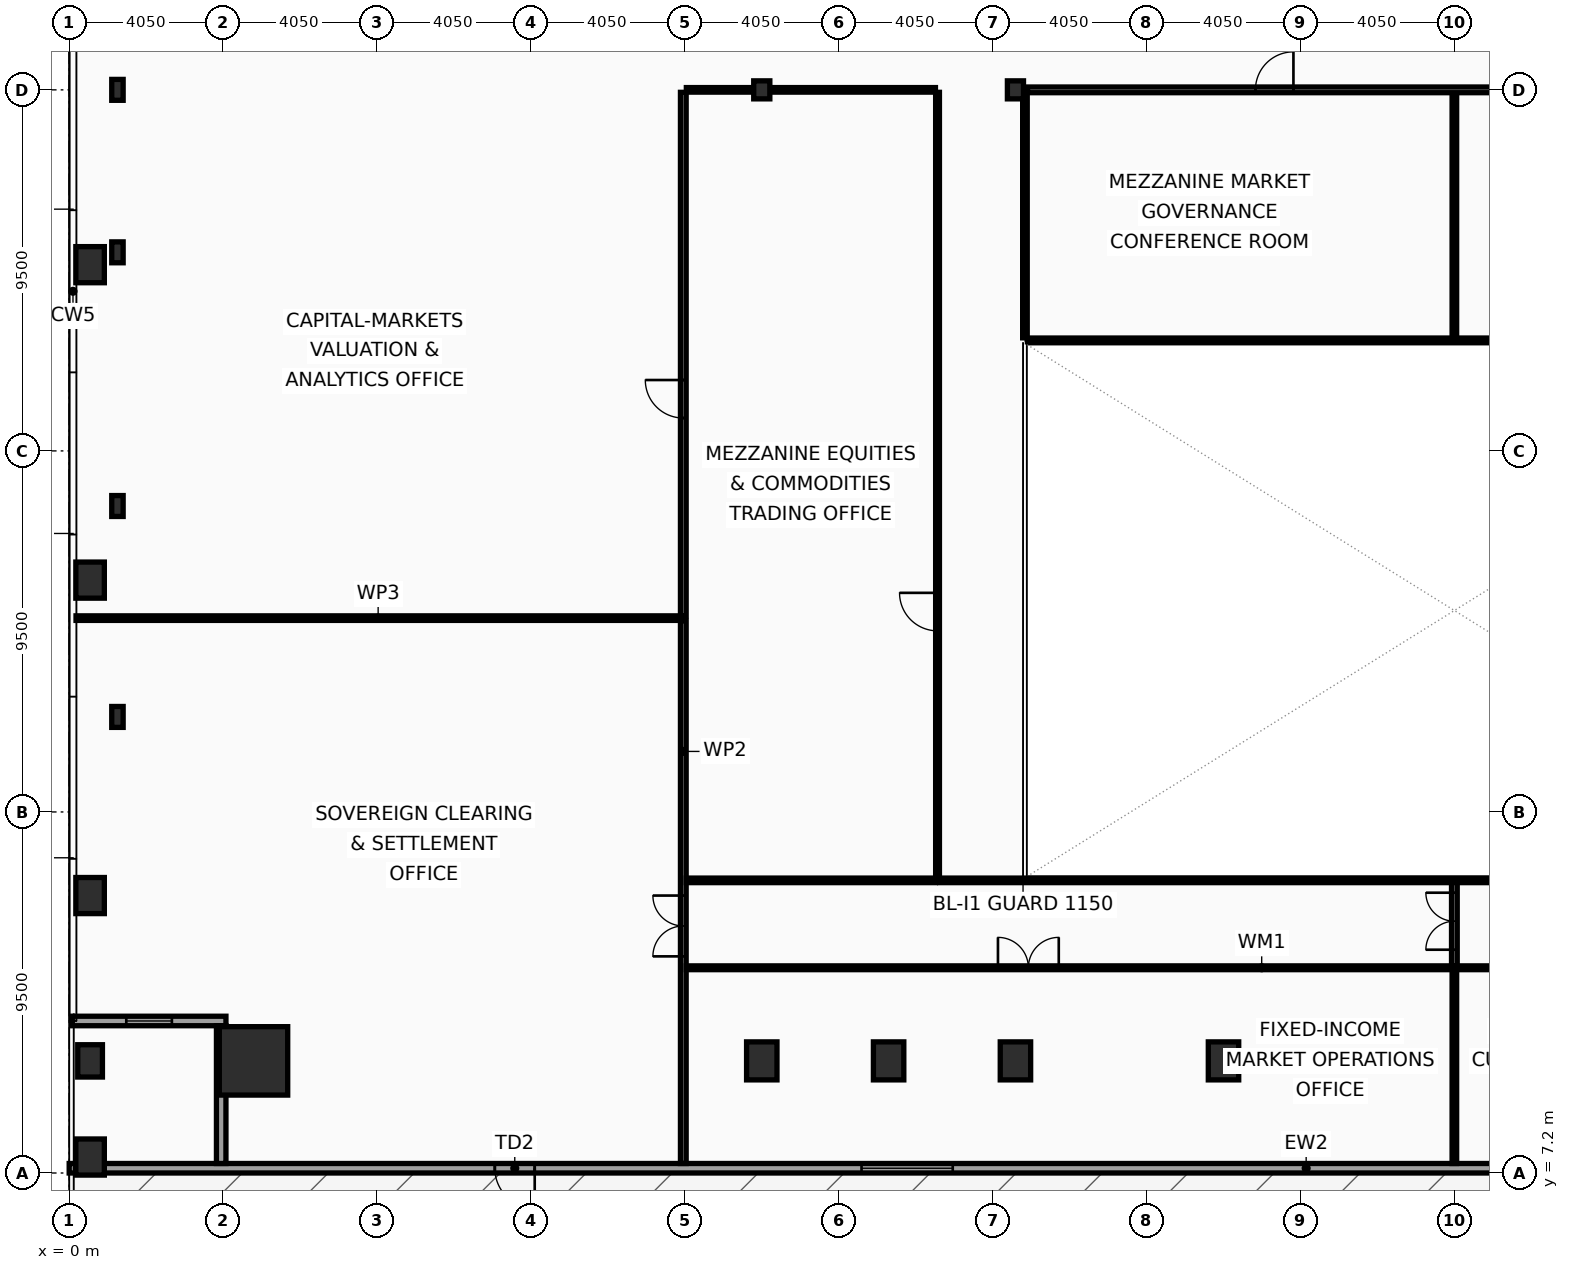
"""IFC4 building model, lengths in metres.
Left out: names, types, materials, properties, quantities, classifications, styles, units other than length and angle.
Written with IfcOpenShell. Run it as: python <this file> out.ifc"""

import sys

from ifc_helpers import new_model, si_unit, direction, frame, frame_2d, origin, origin_2d, place, context, subcontext, project, spatial, rectangle, hollow_rectangle, i_section, extrude, element, fill, save


model = new_model("IFC4")
c1 = context("Model", 3, precision=1e-05, world=origin(), true_north=direction((0.0, 1.0)))
c2 = subcontext(c1, "Body", "Model", "MODEL_VIEW")
j1 = project(units=[si_unit("LENGTHUNIT", "METRE"), si_unit("PLANEANGLEUNIT", "RADIAN")], contexts=[c1])
p1 = place(None, origin())
s1 = spatial("IfcSite", under=j1, at=p1, CompositionType="ELEMENT")
p2 = place(p1, origin())
s2 = spatial("IfcBuilding", under=s1, at=p2, CompositionType="ELEMENT")
p3 = place(p2, frame((0.0, 0.0, 10.4)))
s3 = spatial("IfcBuildingStorey", under=s2, at=p3, CompositionType="ELEMENT", Elevation=10.4)
p4 = place(p3, frame((4.85, 10.15, 0.0), z_axis=(0.0, 0.0, 1.0), x_axis=(1.0, 0.0, 0.0)))
e1 = element("IfcColumn", 1, at=p4, inside=s3, PredefinedType="COLUMN", context=c2, shape_type="SweptSolid", body=[
    extrude(hollow_rectangle(XDim=1.8, YDim=1.8, WallThickness=0.08, at=origin_2d()), origin(), (0.0, 0.0, 1.0), 5.0),
])
for number, where, z_axis, x_axis in (
    (2, (18.225, 10.15, 0.0), (0.0, 0.0, 1.0), (1.0, 0.0, 0.0)),
    (3, (21.562, 10.15, 0.0), (0.0, 0.0, 1.0), (1.0, 0.0, 0.0)),
    (4, (24.9, 10.15, 0.0), (0.0, 0.0, 1.0), (1.0, 0.0, 0.0)),
    (5, (30.375, 10.15, 0.0), (0.0, 0.0, 1.0), (1.0, 0.0, 0.0)),
):
    element("IfcColumn", number, at=place(p3, frame(where, z_axis=z_axis, x_axis=x_axis)), inside=s3, PredefinedType="COLUMN", context=c2, shape_type="SweptSolid", body=[
        extrude(hollow_rectangle(XDim=0.8, YDim=1.0, WallThickness=0.055, at=origin_2d()), origin(), (0.0, 0.0, 1.0), 5.0),
    ])
for number, where, z_axis, x_axis in (
    (6, (1.27, 19.2, 0.0), (0.0, 0.0, 1.0), (1.0, 0.0, 0.0)),
    (7, (1.27, 24.75, 0.0), (0.0, 0.0, 1.0), (1.0, 0.0, 0.0)),
    (8, (1.27, 31.425, 0.0), (0.0, 0.0, 1.0), (1.0, 0.0, 0.0)),
    (9, (1.27, 35.7, 0.0), (0.0, 0.0, 1.0), (1.0, 0.0, 0.0)),
):
    element("IfcColumn", number, at=place(p3, frame(where, z_axis=z_axis, x_axis=x_axis)), inside=s3, PredefinedType="COLUMN", context=c2, shape_type="SweptSolid", body=[
        extrude(i_section(OverallWidth=0.3, OverallDepth=0.55, WebThickness=0.015, FlangeThickness=0.029, at=origin_2d()), origin(), (0.0, 0.0, 1.0), 5.0),
    ])
for number, where, z_axis, x_axis in (
    (10, (18.225, 35.7, 0.0), (0.0, 0.0, 1.0), (1.0, 0.0, 0.0)),
    (11, (24.9, 35.7, 0.0), (0.0, 0.0, 1.0), (1.0, 0.0, 0.0)),
):
    element("IfcColumn", number, at=place(p3, frame(where, z_axis=z_axis, x_axis=x_axis)), inside=s3, PredefinedType="COLUMN", context=c2, shape_type="SweptSolid", body=[
        extrude(i_section(OverallWidth=0.424, OverallDepth=0.474, WebThickness=0.048, FlangeThickness=0.077, at=origin_2d()), origin(), (0.0, 0.0, 1.0), 5.0),
    ])
p5 = place(p3, frame((0.55, 7.62, 0.0), z_axis=(0.0, 0.0, 1.0), x_axis=(1.0, 0.0, 0.0)))
e12 = element("IfcColumn", 12, at=p5, inside=s3, PredefinedType="PILASTER", context=c2, shape_type="SweptSolid", body=[
    extrude(rectangle(XDim=0.75, YDim=0.95, at=origin_2d()), origin(), (0.0, 0.0, 1.0), 5.0),
])
p6 = place(p3, frame((0.55, 10.15, 0.0), z_axis=(0.0, 0.0, 1.0), x_axis=(1.0, 0.0, 0.0)))
e13 = element("IfcColumn", 13, at=p6, inside=s3, PredefinedType="PILASTER", context=c2, shape_type="SweptSolid", body=[
    extrude(rectangle(XDim=0.65, YDim=0.85, at=origin_2d()), origin(), (0.0, 0.0, 1.0), 5.0),
])
for number, where, z_axis, x_axis in (
    (14, (0.55, 14.5, 0.0), (0.0, 0.0, 1.0), (1.0, 0.0, 0.0)),
    (15, (0.55, 22.8, 0.0), (0.0, 0.0, 1.0), (1.0, 0.0, 0.0)),
    (16, (0.55, 31.1, 0.0), (0.0, 0.0, 1.0), (1.0, 0.0, 0.0)),
):
    element("IfcColumn", number, at=place(p3, frame(where, z_axis=z_axis, x_axis=x_axis)), inside=s3, PredefinedType="PILASTER", context=c2, shape_type="SweptSolid", body=[
        extrude(rectangle(XDim=0.75, YDim=0.95, at=origin_2d()), origin(), (0.0, 0.0, 1.0), 5.0),
    ])
p7 = place(p3, frame((72.9, 7.325, 0.0), z_axis=(0.0, 0.0, 1.0), x_axis=(-1.0, 0.0, 0.0)))
e17 = element("IfcWall", 17, at=p7, inside=s3, PredefinedType="SOLIDWALL", context=c2, shape_type="SweptSolid", body=[
    extrude(rectangle(XDim=72.9, YDim=0.25, at=frame_2d((36.45, 0.0))), origin(), (0.0, 0.0, 1.0), 3.89),
])
p8 = place(p7, frame((10.45, 0.0, 0.0)))
e18 = element("IfcOpeningElement", 18, at=p8, cuts=e17, PredefinedType="OPENING", context=c2, shape_type="SweptSolid", body=[
    extrude(rectangle(XDim=1.6, YDim=2.2, at=frame_2d((0.8, 1.1))), frame((0.0, 0.135, 0.0), z_axis=(0.0, -1.0, 0.0), x_axis=(1.0, 0.0, 0.0)), (0.0, 0.0, 1.0), 0.27),
])
p9 = place(p7, frame((29.45, 0.0, 0.0)))
e19 = element("IfcOpeningElement", 19, at=p9, cuts=e17, PredefinedType="OPENING", context=c2, shape_type="SweptSolid", body=[
    extrude(rectangle(XDim=1.6, YDim=2.2, at=frame_2d((0.8, 1.1))), frame((0.0, 0.135, 0.0), z_axis=(0.0, -1.0, 0.0), x_axis=(1.0, 0.0, 0.0)), (0.0, 0.0, 1.0), 0.27),
])
p10 = place(p7, frame((60.65, 0.0, 0.0)))
e20 = element("IfcOpeningElement", 20, at=p10, cuts=e17, PredefinedType="OPENING", context=c2, shape_type="SweptSolid", body=[
    extrude(rectangle(XDim=1.05, YDim=2.15, at=frame_2d((0.525, 1.075))), frame((0.0, 0.135, 0.0), z_axis=(0.0, -1.0, 0.0), x_axis=(1.0, 0.0, 0.0)), (0.0, 0.0, 1.0), 0.27),
])
p11 = place(p7, frame((21.05, 0.0, 0.85)))
e21 = element("IfcOpeningElement", 21, at=p11, cuts=e17, PredefinedType="OPENING", context=c2, shape_type="SweptSolid", body=[
    extrude(rectangle(XDim=2.4, YDim=2.6, at=frame_2d((1.2, 1.3))), frame((0.0, 0.135, 0.0), z_axis=(0.0, -1.0, 0.0), x_axis=(1.0, 0.0, 0.0)), (0.0, 0.0, 1.0), 0.27),
])
p12 = place(p7, frame((49.65, 0.0, 0.85)))
e22 = element("IfcOpeningElement", 22, at=p12, cuts=e17, PredefinedType="OPENING", context=c2, shape_type="SweptSolid", body=[
    extrude(rectangle(XDim=2.4, YDim=2.6, at=frame_2d((1.2, 1.3))), frame((0.0, 0.135, 0.0), z_axis=(0.0, -1.0, 0.0), x_axis=(1.0, 0.0, 0.0)), (0.0, 0.0, 1.0), 0.27),
])
p13 = place(p3, frame((4.125, 11.2, 0.0), z_axis=(0.0, 0.0, 1.0), x_axis=(-1.0, 0.0, 0.0)))
e23 = element("IfcWall", 23, at=p13, inside=s3, PredefinedType="SOLIDWALL", context=c2, shape_type="SweptSolid", body=[
    extrude(rectangle(XDim=4.045, YDim=0.25, at=frame_2d((2.022, 0.0))), origin(), (0.0, 0.0, 1.0), 4.14),
])
p14 = place(p13, frame((1.423, 0.0, 0.9)))
e24 = element("IfcOpeningElement", 24, at=p14, cuts=e23, PredefinedType="OPENING", context=c2, shape_type="SweptSolid", body=[
    extrude(rectangle(XDim=1.2, YDim=2.8, at=frame_2d((0.6, 1.4))), frame((0.0, 0.135, 0.0), z_axis=(0.0, -1.0, 0.0), x_axis=(1.0, 0.0, 0.0)), (0.0, 0.0, 1.0), 0.27),
])
p15 = place(p3, frame((4.0, 7.45, 0.0), z_axis=(0.0, 0.0, 1.0), x_axis=(0.0, 1.0, 0.0)))
e25 = element("IfcWall", 25, at=p15, inside=s3, PredefinedType="SOLIDWALL", context=c2, shape_type="SweptSolid", body=[
    extrude(rectangle(XDim=3.625, YDim=0.25, at=frame_2d((1.812, 0.0))), origin(), (0.0, 0.0, 1.0), 4.14),
])
p16 = place(p3, frame((16.16, 7.45, 0.0), z_axis=(0.0, 0.0, 1.0), x_axis=(0.0, 1.0, 0.0)))
e26 = element("IfcWall", 26, at=p16, inside=s3, PredefinedType="PARTITIONING", context=c2, shape_type="SweptSolid", body=[
    extrude(rectangle(XDim=14.285, YDim=0.15, at=frame_2d((7.143, 0.0))), origin(), (0.0, 0.0, 1.0), 3.89),
])
p17 = place(p16, frame((5.45, 0.0, 0.0)))
e27 = element("IfcOpeningElement", 27, at=p17, cuts=e26, PredefinedType="OPENING", context=c2, shape_type="SweptSolid", body=[
    extrude(rectangle(XDim=1.6, YDim=2.15, at=frame_2d((0.8, 1.075))), frame((0.0, 0.085, 0.0), z_axis=(0.0, -1.0, 0.0), x_axis=(1.0, 0.0, 0.0)), (0.0, 0.0, 1.0), 0.17),
])
p18 = place(p3, frame((16.16, 21.865, 0.0), z_axis=(0.0, 0.0, 1.0), x_axis=(0.0, 1.0, 0.0)))
e28 = element("IfcWall", 28, at=p18, inside=s3, PredefinedType="PARTITIONING", context=c2, shape_type="SweptSolid", body=[
    extrude(rectangle(XDim=13.77, YDim=0.15, at=frame_2d((6.885, 0.0))), origin(), (0.0, 0.0, 1.0), 3.89),
])
p19 = place(p18, frame((5.2, 0.0, 0.0)))
e29 = element("IfcOpeningElement", 29, at=p19, cuts=e28, PredefinedType="OPENING", context=c2, shape_type="SweptSolid", body=[
    extrude(rectangle(XDim=1.0, YDim=2.05, at=frame_2d((0.5, 1.025))), frame((0.0, 0.085, 0.0), z_axis=(0.0, -1.0, 0.0), x_axis=(1.0, 0.0, 0.0)), (0.0, 0.0, 1.0), 0.17),
])
p20 = place(p3, frame((0.18, 21.8, 0.0), z_axis=(0.0, 0.0, 1.0), x_axis=(1.0, 0.0, 0.0)))
e30 = element("IfcWall", 30, at=p20, inside=s3, PredefinedType="PARTITIONING", context=c2, shape_type="SweptSolid", body=[
    extrude(rectangle(XDim=15.9, YDim=0.12, at=frame_2d((7.95, 0.0))), origin(), (0.0, 0.0, 1.0), 4.14),
])
p21 = place(p3, frame((16.24, 12.6, 0.0), z_axis=(0.0, 0.0, 1.0), x_axis=(1.0, 0.0, 0.0)))
e31 = element("IfcWall", 31, at=p21, inside=s3, PredefinedType="MOVABLE", context=c2, shape_type="SweptSolid", body=[
    extrude(rectangle(XDim=20.13, YDim=0.1, at=frame_2d((10.065, 0.0))), origin(), (0.0, 0.0, 1.0), 3.89),
])
p22 = place(p21, frame((8.2, 0.0, 0.0)))
e32 = element("IfcOpeningElement", 32, at=p22, cuts=e31, PredefinedType="OPENING", context=c2, shape_type="SweptSolid", body=[
    extrude(rectangle(XDim=1.6, YDim=2.15, at=frame_2d((0.8, 1.075))), frame((0.0, 0.06, 0.0), z_axis=(0.0, -1.0, 0.0), x_axis=(1.0, 0.0, 0.0)), (0.0, 0.0, 1.0), 0.12),
])
p23 = place(p3, frame((36.53, 12.6, 0.0), z_axis=(0.0, 0.0, 1.0), x_axis=(1.0, 0.0, 0.0)))
e33 = element("IfcWall", 33, at=p23, inside=s3, PredefinedType="MOVABLE", context=c2, shape_type="SweptSolid", body=[
    extrude(rectangle(XDim=20.13, YDim=0.1, at=frame_2d((10.065, 0.0))), origin(), (0.0, 0.0, 1.0), 3.89),
])
p24 = place(p23, frame((8.2, 0.0, 0.0)))
e34 = element("IfcOpeningElement", 34, at=p24, cuts=e33, PredefinedType="OPENING", context=c2, shape_type="SweptSolid", body=[
    extrude(rectangle(XDim=1.6, YDim=2.15, at=frame_2d((0.8, 1.075))), frame((0.0, 0.06, 0.0), z_axis=(0.0, -1.0, 0.0), x_axis=(1.0, 0.0, 0.0)), (0.0, 0.0, 1.0), 0.12),
])
p25 = place(p3, frame((36.45, 7.45, 0.0), z_axis=(0.0, 0.0, 1.0), x_axis=(0.0, 1.0, 0.0)))
e35 = element("IfcWall", 35, at=p25, inside=s3, PredefinedType="PARTITIONING", context=c2, shape_type="SweptSolid", body=[
    extrude(rectangle(XDim=5.095, YDim=0.12, at=frame_2d((2.547, 0.0))), origin(), (0.0, 0.0, 1.0), 4.14),
])
p26 = place(p3, frame((25.215, 29.12, 0.0), z_axis=(0.0, 0.0, 1.0), x_axis=(1.0, 0.0, 0.0)))
e36 = element("IfcWall", 36, at=p26, inside=s3, PredefinedType="MOVABLE", context=c2, shape_type="SweptSolid", body=[
    extrude(rectangle(XDim=22.47, YDim=0.1, at=frame_2d((11.235, 0.0))), origin(), (0.0, 0.0, 1.0), 3.89),
])
p27 = place(p3, frame((36.45, 29.175, 0.0), z_axis=(0.0, 0.0, 1.0), x_axis=(0.0, 1.0, 0.0)))
e37 = element("IfcWall", 37, at=p27, inside=s3, PredefinedType="PARTITIONING", context=c2, shape_type="SweptSolid", body=[
    extrude(rectangle(XDim=6.445, YDim=0.12, at=frame_2d((3.223, 0.0))), origin(), (0.0, 0.0, 1.0), 3.89),
])
p28 = place(p3, frame((25.215, 35.7, 0.0), z_axis=(0.0, 0.0, 1.0), x_axis=(1.0, 0.0, 0.0)))
e38 = element("IfcWall", 38, at=p28, inside=s3, PredefinedType="PARTITIONING", context=c2, shape_type="SweptSolid", body=[
    extrude(rectangle(XDim=22.47, YDim=0.15, at=frame_2d((11.235, 0.0))), origin(), (0.0, 0.0, 1.0), 3.89),
])
p29 = place(p28, frame((6.0, 0.0, 0.0)))
e39 = element("IfcOpeningElement", 39, at=p29, cuts=e38, PredefinedType="OPENING", context=c2, shape_type="SweptSolid", body=[
    extrude(rectangle(XDim=1.0, YDim=2.05, at=frame_2d((0.5, 1.025))), frame((0.0, 0.085, 0.0), z_axis=(0.0, -1.0, 0.0), x_axis=(1.0, 0.0, 0.0)), (0.0, 0.0, 1.0), 0.17),
])
p30 = place(p28, frame((18.5, 0.0, 0.0)))
e40 = element("IfcOpeningElement", 40, at=p30, cuts=e38, PredefinedType="OPENING", context=c2, shape_type="SweptSolid", body=[
    extrude(rectangle(XDim=1.0, YDim=2.05, at=frame_2d((0.5, 1.025))), frame((0.0, 0.085, 0.0), z_axis=(0.0, -1.0, 0.0), x_axis=(1.0, 0.0, 0.0)), (0.0, 0.0, 1.0), 0.17),
])
p31 = place(p3, frame((25.15, 29.175, 0.0), z_axis=(0.0, 0.0, 1.0), x_axis=(0.0, 1.0, 0.0)))
e41 = element("IfcWall", 41, at=p31, inside=s3, PredefinedType="PARTITIONING", context=c2, shape_type="SweptSolid", body=[
    extrude(rectangle(XDim=6.445, YDim=0.12, at=frame_2d((3.223, 0.0))), origin(), (0.0, 0.0, 1.0), 3.89),
])
p32 = place(p3, frame((22.85, 14.965, 0.0), z_axis=(0.0, 0.0, 1.0), x_axis=(0.0, 1.0, 0.0)))
e42 = element("IfcWall", 42, at=p32, inside=s3, PredefinedType="MOVABLE", context=c2, shape_type="SweptSolid", body=[
    extrude(rectangle(XDim=20.67, YDim=0.1, at=frame_2d((10.335, 0.0))), origin(), (0.0, 0.0, 1.0), 4.19),
])
p33 = place(p32, frame((6.5, 0.0, 0.0)))
e43 = element("IfcOpeningElement", 43, at=p33, cuts=e42, PredefinedType="OPENING", context=c2, shape_type="SweptSolid", body=[
    extrude(rectangle(XDim=1.0, YDim=2.05, at=frame_2d((0.5, 1.025))), frame((0.0, 0.06, 0.0), z_axis=(0.0, -1.0, 0.0), x_axis=(1.0, 0.0, 0.0)), (0.0, 0.0, 1.0), 0.12),
])
for number, where, z_axis, x_axis in (
    (44, (16.24, 14.9, 0.0), (0.0, 0.0, 1.0), (1.0, 0.0, 0.0)),
    (45, (16.24, 35.7, 0.0), (0.0, 0.0, 1.0), (1.0, 0.0, 0.0)),
):
    element("IfcWall", number, at=place(p3, frame(where, z_axis=z_axis, x_axis=x_axis)), inside=s3, PredefinedType="PARTITIONING", context=c2, shape_type="SweptSolid", body=[
        extrude(rectangle(XDim=6.555, YDim=0.12, at=frame_2d((3.277, 0.0))), origin(), (0.0, 0.0, 1.0), 3.89),
    ])
p34 = place(p3, frame((36.45, 12.655, 0.0), z_axis=(0.0, 0.0, 1.0), x_axis=(0.0, 1.0, 0.0)))
e46 = element("IfcWall", 46, at=p34, inside=s3, PredefinedType="PARTITIONING", context=c2, shape_type="SweptSolid", body=[
    extrude(rectangle(XDim=2.28, YDim=0.15, at=frame_2d((1.14, 0.0))), origin(), (0.0, 0.0, 1.0), 3.89),
])
p35 = place(p34, frame((0.42, 0.0, 0.0)))
e47 = element("IfcOpeningElement", 47, at=p35, cuts=e46, PredefinedType="OPENING", context=c2, shape_type="SweptSolid", body=[
    extrude(rectangle(XDim=1.5, YDim=2.15, at=frame_2d((0.75, 1.075))), frame((0.0, 0.085, 0.0), z_axis=(0.0, -1.0, 0.0), x_axis=(1.0, 0.0, 0.0)), (0.0, 0.0, 1.0), 0.17),
])
p36 = place(p3, frame((22.905, 14.9, 0.0), z_axis=(0.0, 0.0, 1.0), x_axis=(1.0, 0.0, 0.0)))
e48 = element("IfcWall", 48, at=p36, inside=s3, PredefinedType="PARTITIONING", context=c2, shape_type="SweptSolid", body=[
    extrude(rectangle(XDim=27.09, YDim=0.12, at=frame_2d((13.545, 0.0))), origin(), (0.0, 0.0, 1.0), 3.89),
])
p37 = place(p10, origin())
e49 = element("IfcDoor", 49, at=p37, inside=s3, OperationType="SINGLE_SWING_LEFT", PredefinedType="DOOR", context=c2, shape_type="SweptSolid", body=[
    extrude(rectangle(XDim=1.05, YDim=2.15, at=frame_2d((0.525, 1.075))), frame((0.0, 0.025, 0.0), z_axis=(0.0, -1.0, 0.0), x_axis=(1.0, 0.0, 0.0)), (0.0, 0.0, 1.0), 0.05),
])
fill(e20, e49)
p38 = place(p12, origin())
e50 = element("IfcWindow", 50, at=p38, inside=s3, PartitioningType="SINGLE_PANEL", PredefinedType="WINDOW", context=c2, shape_type="SweptSolid", body=[
    extrude(rectangle(XDim=2.4, YDim=2.6, at=frame_2d((1.2, 1.3))), frame((0.0, 0.03, 0.0), z_axis=(0.0, -1.0, 0.0), x_axis=(1.0, 0.0, 0.0)), (0.0, 0.0, 1.0), 0.06),
])
fill(e22, e50)
p39 = place(p14, origin())
e51 = element("IfcWindow", 51, at=p39, inside=s3, PartitioningType="SINGLE_PANEL", PredefinedType="WINDOW", context=c2, shape_type="SweptSolid", body=[
    extrude(rectangle(XDim=1.2, YDim=2.8, at=frame_2d((0.6, 1.4))), frame((0.0, 0.03, 0.0), z_axis=(0.0, -1.0, 0.0), x_axis=(1.0, 0.0, 0.0)), (0.0, 0.0, 1.0), 0.06),
])
fill(e24, e51)
p40 = place(p17, origin())
e52 = element("IfcDoor", 52, at=p40, inside=s3, OperationType="DOUBLE_DOOR_SINGLE_SWING", PredefinedType="DOOR", context=c2, shape_type="SweptSolid", body=[
    extrude(rectangle(XDim=1.6, YDim=2.15, at=frame_2d((0.8, 1.075))), frame((0.0, 0.025, 0.0), z_axis=(0.0, -1.0, 0.0), x_axis=(1.0, 0.0, 0.0)), (0.0, 0.0, 1.0), 0.05),
])
fill(e27, e52)
p41 = place(p19, origin())
e53 = element("IfcDoor", 53, at=p41, inside=s3, OperationType="SINGLE_SWING_RIGHT", PredefinedType="DOOR", context=c2, shape_type="SweptSolid", body=[
    extrude(rectangle(XDim=1.0, YDim=2.05, at=frame_2d((0.5, 1.025))), frame((0.0, 0.025, 0.0), z_axis=(0.0, -1.0, 0.0), x_axis=(1.0, 0.0, 0.0)), (0.0, 0.0, 1.0), 0.05),
])
fill(e29, e53)
p42 = place(p22, origin())
e54 = element("IfcDoor", 54, at=p42, inside=s3, OperationType="DOUBLE_DOOR_SINGLE_SWING", PredefinedType="DOOR", context=c2, shape_type="SweptSolid", body=[
    extrude(rectangle(XDim=1.6, YDim=2.15, at=frame_2d((0.8, 1.075))), frame((0.0, 0.025, 0.0), z_axis=(0.0, -1.0, 0.0), x_axis=(1.0, 0.0, 0.0)), (0.0, 0.0, 1.0), 0.05),
])
fill(e32, e54)
p43 = place(p29, origin())
e55 = element("IfcDoor", 55, at=p43, inside=s3, OperationType="SINGLE_SWING_RIGHT", PredefinedType="DOOR", context=c2, shape_type="SweptSolid", body=[
    extrude(rectangle(XDim=1.0, YDim=2.05, at=frame_2d((0.5, 1.025))), frame((0.0, 0.025, 0.0), z_axis=(0.0, -1.0, 0.0), x_axis=(1.0, 0.0, 0.0)), (0.0, 0.0, 1.0), 0.05),
])
fill(e39, e55)
p44 = place(p33, origin())
e56 = element("IfcDoor", 56, at=p44, inside=s3, OperationType="SINGLE_SWING_RIGHT", PredefinedType="DOOR", context=c2, shape_type="SweptSolid", body=[
    extrude(rectangle(XDim=1.0, YDim=2.05, at=frame_2d((0.5, 1.025))), frame((0.0, 0.025, 0.0), z_axis=(0.0, -1.0, 0.0), x_axis=(1.0, 0.0, 0.0)), (0.0, 0.0, 1.0), 0.05),
])
fill(e43, e56)
p45 = place(p35, origin())
e57 = element("IfcDoor", 57, at=p45, inside=s3, OperationType="DOUBLE_DOOR_SINGLE_SWING", PredefinedType="DOOR", context=c2, shape_type="SweptSolid", body=[
    extrude(rectangle(XDim=1.5, YDim=2.15, at=frame_2d((0.75, 1.075))), frame((0.0, 0.025, 0.0), z_axis=(0.0, -1.0, 0.0), x_axis=(1.0, 0.0, 0.0)), (0.0, 0.0, 1.0), 0.05),
])
fill(e47, e57)
save(model, sys.argv[1])
